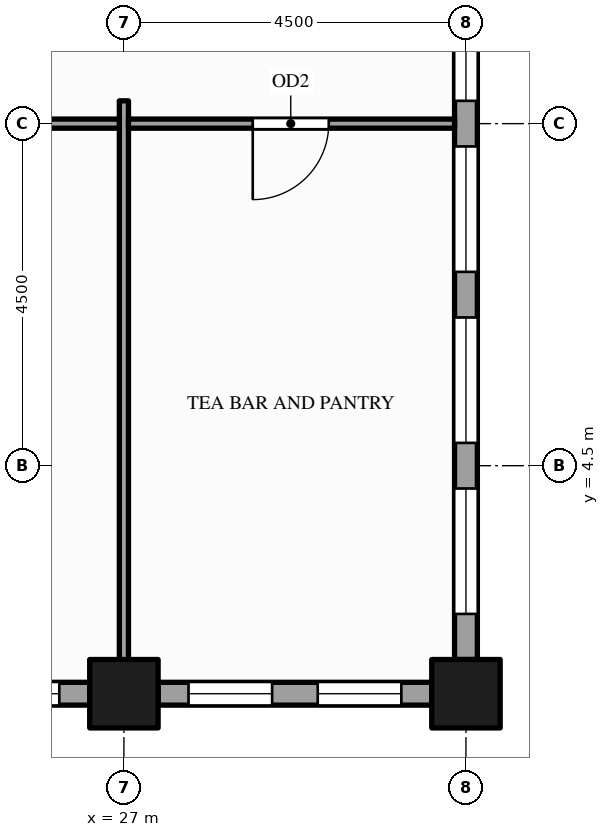
"""IFC4 building model, lengths in metres.
Left out: names, types, materials, properties, quantities, classifications, styles, units other than length and angle.
Written with IfcOpenShell. Run it as: python <this file> out.ifc"""

import sys

from ifc_helpers import new_model, si_unit, direction, frame, frame_2d, origin, origin_2d, place, context, subcontext, project, spatial, rectangle, hollow_rectangle, extrude, element, fill, save


model = new_model("IFC4")
c1 = context("Model", 3, precision=1e-05, world=origin(), true_north=direction((0.0, 1.0)))
c2 = subcontext(c1, "Body", "Model", "MODEL_VIEW")
j1 = project(units=[si_unit("LENGTHUNIT", "METRE"), si_unit("PLANEANGLEUNIT", "RADIAN")], contexts=[c1])
p1 = place(None, origin())
s1 = spatial("IfcSite", under=j1, at=p1, CompositionType="ELEMENT")
p2 = place(p1, origin())
s2 = spatial("IfcBuilding", under=s1, at=p2, CompositionType="ELEMENT")
p3 = place(p2, frame((0.0, 0.0, 143.0)))
s3 = spatial("IfcBuildingStorey", under=s2, at=p3, CompositionType="ELEMENT", Elevation=143.0)
for number, where, z_axis, x_axis in (
    (1, (27.0, 1.5, -0.15), (0.0, 0.0, 1.0), (1.0, 0.0, 0.0)),
    (2, (31.5, 1.5, -0.15), (0.0, 0.0, 1.0), (1.0, 0.0, 0.0)),
):
    element("IfcColumn", number, at=place(p3, frame(where, z_axis=z_axis, x_axis=x_axis)), inside=s3, PredefinedType="COLUMN", context=c2, shape_type="SweptSolid", body=[
        extrude(hollow_rectangle(XDim=0.9, YDim=0.9, WallThickness=0.045, at=origin_2d()), origin(), (0.0, 0.0, 1.0), 4.0),
    ])
p4 = place(p3, frame((22.95, 1.5, 0.0), z_axis=(0.0, 0.0, 1.0), x_axis=(1.0, 0.0, 0.0)))
e3 = element("IfcWall", 3, at=p4, inside=s3, PredefinedType="STANDARD", context=c2, shape_type="SweptSolid", body=[
    extrude(rectangle(XDim=3.6, YDim=0.3, at=frame_2d((1.8, 0.0))), origin(), (0.0, 0.0, 1.0), 2.87),
])
p5 = place(p4, frame((0.4, 0.0, 0.9)))
e4 = element("IfcOpeningElement", 4, at=p5, cuts=e3, PredefinedType="OPENING", context=c2, shape_type="SweptSolid", body=[
    extrude(rectangle(XDim=1.1, YDim=1.75, at=frame_2d((0.55, 0.875))), frame((0.0, 0.16, 0.0), z_axis=(0.0, -1.0, 0.0), x_axis=(1.0, 0.0, 0.0)), (0.0, 0.0, 1.0), 0.32),
])
p6 = place(p4, frame((2.1, 0.0, 0.9)))
e5 = element("IfcOpeningElement", 5, at=p6, cuts=e3, PredefinedType="OPENING", context=c2, shape_type="SweptSolid", body=[
    extrude(rectangle(XDim=1.1, YDim=1.75, at=frame_2d((0.55, 0.875))), frame((0.0, 0.16, 0.0), z_axis=(0.0, -1.0, 0.0), x_axis=(1.0, 0.0, 0.0)), (0.0, 0.0, 1.0), 0.32),
])
p7 = place(p3, frame((27.45, 1.5, 0.0), z_axis=(0.0, 0.0, 1.0), x_axis=(1.0, 0.0, 0.0)))
e6 = element("IfcWall", 6, at=p7, inside=s3, PredefinedType="STANDARD", context=c2, shape_type="SweptSolid", body=[
    extrude(rectangle(XDim=3.6, YDim=0.3, at=frame_2d((1.8, 0.0))), origin(), (0.0, 0.0, 1.0), 2.87),
])
p8 = place(p7, frame((0.4, 0.0, 0.9)))
e7 = element("IfcOpeningElement", 7, at=p8, cuts=e6, PredefinedType="OPENING", context=c2, shape_type="SweptSolid", body=[
    extrude(rectangle(XDim=1.1, YDim=1.75, at=frame_2d((0.55, 0.875))), frame((0.0, 0.16, 0.0), z_axis=(0.0, -1.0, 0.0), x_axis=(1.0, 0.0, 0.0)), (0.0, 0.0, 1.0), 0.32),
])
p9 = place(p7, frame((2.1, 0.0, 0.9)))
e8 = element("IfcOpeningElement", 8, at=p9, cuts=e6, PredefinedType="OPENING", context=c2, shape_type="SweptSolid", body=[
    extrude(rectangle(XDim=1.1, YDim=1.75, at=frame_2d((0.55, 0.875))), frame((0.0, 0.16, 0.0), z_axis=(0.0, -1.0, 0.0), x_axis=(1.0, 0.0, 0.0)), (0.0, 0.0, 1.0), 0.32),
])
p10 = place(p3, frame((31.5, 1.95, 0.0), z_axis=(0.0, 0.0, 1.0), x_axis=(0.0, 1.0, 0.0)))
e9 = element("IfcWall", 9, at=p10, inside=s3, PredefinedType="STANDARD", context=c2, shape_type="SweptSolid", body=[
    extrude(rectangle(XDim=21.6, YDim=0.3, at=frame_2d((10.8, 0.0))), origin(), (0.0, 0.0, 1.0), 3.149),
])
p11 = place(p10, frame((0.6, 0.0, 0.9)))
e10 = element("IfcOpeningElement", 10, at=p11, cuts=e9, PredefinedType="OPENING", context=c2, shape_type="SweptSolid", body=[
    extrude(rectangle(XDim=1.65, YDim=2.0, at=frame_2d((0.825, 1.0))), frame((0.0, 0.16, 0.0), z_axis=(0.0, -1.0, 0.0), x_axis=(1.0, 0.0, 0.0)), (0.0, 0.0, 1.0), 0.32),
])
p12 = place(p10, frame((2.85, 0.0, 0.9)))
e11 = element("IfcOpeningElement", 11, at=p12, cuts=e9, PredefinedType="OPENING", context=c2, shape_type="SweptSolid", body=[
    extrude(rectangle(XDim=1.65, YDim=2.0, at=frame_2d((0.825, 1.0))), frame((0.0, 0.16, 0.0), z_axis=(0.0, -1.0, 0.0), x_axis=(1.0, 0.0, 0.0)), (0.0, 0.0, 1.0), 0.32),
])
p13 = place(p10, frame((5.1, 0.0, 0.9)))
e12 = element("IfcOpeningElement", 12, at=p13, cuts=e9, PredefinedType="OPENING", context=c2, shape_type="SweptSolid", body=[
    extrude(rectangle(XDim=1.65, YDim=2.0, at=frame_2d((0.825, 1.0))), frame((0.0, 0.16, 0.0), z_axis=(0.0, -1.0, 0.0), x_axis=(1.0, 0.0, 0.0)), (0.0, 0.0, 1.0), 0.32),
])
p14 = place(p10, frame((7.35, 0.0, 0.9)))
e13 = element("IfcOpeningElement", 13, at=p14, cuts=e9, PredefinedType="OPENING", context=c2, shape_type="SweptSolid", body=[
    extrude(rectangle(XDim=1.65, YDim=2.0, at=frame_2d((0.825, 1.0))), frame((0.0, 0.16, 0.0), z_axis=(0.0, -1.0, 0.0), x_axis=(1.0, 0.0, 0.0)), (0.0, 0.0, 1.0), 0.32),
])
p15 = place(p10, frame((9.6, 0.0, 0.9)))
e14 = element("IfcOpeningElement", 14, at=p15, cuts=e9, PredefinedType="OPENING", context=c2, shape_type="SweptSolid", body=[
    extrude(rectangle(XDim=1.65, YDim=2.0, at=frame_2d((0.825, 1.0))), frame((0.0, 0.16, 0.0), z_axis=(0.0, -1.0, 0.0), x_axis=(1.0, 0.0, 0.0)), (0.0, 0.0, 1.0), 0.32),
])
p16 = place(p10, frame((11.85, 0.0, 0.9)))
e15 = element("IfcOpeningElement", 15, at=p16, cuts=e9, PredefinedType="OPENING", context=c2, shape_type="SweptSolid", body=[
    extrude(rectangle(XDim=1.65, YDim=2.0, at=frame_2d((0.825, 1.0))), frame((0.0, 0.16, 0.0), z_axis=(0.0, -1.0, 0.0), x_axis=(1.0, 0.0, 0.0)), (0.0, 0.0, 1.0), 0.32),
])
p17 = place(p10, frame((14.1, 0.0, 0.9)))
e16 = element("IfcOpeningElement", 16, at=p17, cuts=e9, PredefinedType="OPENING", context=c2, shape_type="SweptSolid", body=[
    extrude(rectangle(XDim=1.65, YDim=2.0, at=frame_2d((0.825, 1.0))), frame((0.0, 0.16, 0.0), z_axis=(0.0, -1.0, 0.0), x_axis=(1.0, 0.0, 0.0)), (0.0, 0.0, 1.0), 0.32),
])
p18 = place(p10, frame((16.35, 0.0, 0.9)))
e17 = element("IfcOpeningElement", 17, at=p18, cuts=e9, PredefinedType="OPENING", context=c2, shape_type="SweptSolid", body=[
    extrude(rectangle(XDim=1.65, YDim=2.0, at=frame_2d((0.825, 1.0))), frame((0.0, 0.16, 0.0), z_axis=(0.0, -1.0, 0.0), x_axis=(1.0, 0.0, 0.0)), (0.0, 0.0, 1.0), 0.32),
])
p19 = place(p10, frame((18.6, 0.0, 0.9)))
e18 = element("IfcOpeningElement", 18, at=p19, cuts=e9, PredefinedType="OPENING", context=c2, shape_type="SweptSolid", body=[
    extrude(rectangle(XDim=1.65, YDim=2.0, at=frame_2d((0.825, 1.0))), frame((0.0, 0.16, 0.0), z_axis=(0.0, -1.0, 0.0), x_axis=(1.0, 0.0, 0.0)), (0.0, 0.0, 1.0), 0.32),
])
p20 = place(p3, frame((27.0, 1.65, 0.0), z_axis=(0.0, 0.0, 1.0), x_axis=(0.0, 1.0, 0.0)))
e19 = element("IfcWall", 19, at=p20, inside=s3, PredefinedType="PARTITIONING", context=c2, shape_type="SweptSolid", body=[
    extrude(rectangle(XDim=7.65, YDim=0.12, at=frame_2d((3.825, 0.0))), origin(), (0.0, 0.0, 1.0), 2.87),
])
p21 = place(p3, frame((18.06, 9.0, 0.0), z_axis=(0.0, 0.0, 1.0), x_axis=(1.0, 0.0, 0.0)))
e20 = element("IfcWall", 20, at=p21, inside=s3, PredefinedType="PARTITIONING", context=c2, shape_type="SweptSolid", body=[
    extrude(rectangle(XDim=8.88, YDim=0.12, at=frame_2d((4.44, 0.0))), origin(), (0.0, 0.0, 1.0), 2.87),
])
p22 = place(p21, frame((3.54, 0.0, 0.0)))
e21 = element("IfcOpeningElement", 21, at=p22, cuts=e20, PredefinedType="OPENING", context=c2, shape_type="SweptSolid", body=[
    extrude(rectangle(XDim=1.8, YDim=2.1, at=frame_2d((0.9, 1.05))), frame((0.0, 0.07, 0.0), z_axis=(0.0, -1.0, 0.0), x_axis=(1.0, 0.0, 0.0)), (0.0, 0.0, 1.0), 0.14),
])
p23 = place(p3, frame((27.06, 9.0, 0.0), z_axis=(0.0, 0.0, 1.0), x_axis=(1.0, 0.0, 0.0)))
e22 = element("IfcWall", 22, at=p23, inside=s3, PredefinedType="PARTITIONING", context=c2, shape_type="SweptSolid", body=[
    extrude(rectangle(XDim=4.29, YDim=0.12, at=frame_2d((2.145, 0.0))), origin(), (0.0, 0.0, 1.0), 2.87),
])
p24 = place(p23, frame((1.635, 0.0, 0.0)))
e23 = element("IfcOpeningElement", 23, at=p24, cuts=e22, PredefinedType="OPENING", context=c2, shape_type="SweptSolid", body=[
    extrude(rectangle(XDim=1.0, YDim=2.1, at=frame_2d((0.5, 1.05))), frame((0.0, 0.07, 0.0), z_axis=(0.0, -1.0, 0.0), x_axis=(1.0, 0.0, 0.0)), (0.0, 0.0, 1.0), 0.14),
])
p25 = place(p6, origin())
e24 = element("IfcWindow", 24, at=p25, inside=s3, PartitioningType="SINGLE_PANEL", PredefinedType="WINDOW", context=c2, shape_type="SweptSolid", body=[
    extrude(rectangle(XDim=1.1, YDim=1.75, at=frame_2d((0.55, 0.875))), frame((0.0, 0.03, 0.0), z_axis=(0.0, -1.0, 0.0), x_axis=(1.0, 0.0, 0.0)), (0.0, 0.0, 1.0), 0.06),
])
fill(e5, e24)
p26 = place(p8, origin())
e25 = element("IfcWindow", 25, at=p26, inside=s3, PartitioningType="SINGLE_PANEL", PredefinedType="WINDOW", context=c2, shape_type="SweptSolid", body=[
    extrude(rectangle(XDim=1.1, YDim=1.75, at=frame_2d((0.55, 0.875))), frame((0.0, 0.03, 0.0), z_axis=(0.0, -1.0, 0.0), x_axis=(1.0, 0.0, 0.0)), (0.0, 0.0, 1.0), 0.06),
])
fill(e7, e25)
p27 = place(p9, origin())
e26 = element("IfcWindow", 26, at=p27, inside=s3, PartitioningType="SINGLE_PANEL", PredefinedType="WINDOW", context=c2, shape_type="SweptSolid", body=[
    extrude(rectangle(XDim=1.1, YDim=1.75, at=frame_2d((0.55, 0.875))), frame((0.0, 0.03, 0.0), z_axis=(0.0, -1.0, 0.0), x_axis=(1.0, 0.0, 0.0)), (0.0, 0.0, 1.0), 0.06),
])
fill(e8, e26)
p28 = place(p11, origin())
e27 = element("IfcWindow", 27, at=p28, inside=s3, PartitioningType="SINGLE_PANEL", PredefinedType="WINDOW", context=c2, shape_type="SweptSolid", body=[
    extrude(rectangle(XDim=1.65, YDim=2.0, at=frame_2d((0.825, 1.0))), frame((0.0, 0.03, 0.0), z_axis=(0.0, -1.0, 0.0), x_axis=(1.0, 0.0, 0.0)), (0.0, 0.0, 1.0), 0.06),
])
fill(e10, e27)
p29 = place(p12, origin())
e28 = element("IfcWindow", 28, at=p29, inside=s3, PartitioningType="SINGLE_PANEL", PredefinedType="WINDOW", context=c2, shape_type="SweptSolid", body=[
    extrude(rectangle(XDim=1.65, YDim=2.0, at=frame_2d((0.825, 1.0))), frame((0.0, 0.03, 0.0), z_axis=(0.0, -1.0, 0.0), x_axis=(1.0, 0.0, 0.0)), (0.0, 0.0, 1.0), 0.06),
])
fill(e11, e28)
p30 = place(p13, origin())
e29 = element("IfcWindow", 29, at=p30, inside=s3, PartitioningType="SINGLE_PANEL", PredefinedType="WINDOW", context=c2, shape_type="SweptSolid", body=[
    extrude(rectangle(XDim=1.65, YDim=2.0, at=frame_2d((0.825, 1.0))), frame((0.0, 0.03, 0.0), z_axis=(0.0, -1.0, 0.0), x_axis=(1.0, 0.0, 0.0)), (0.0, 0.0, 1.0), 0.06),
])
fill(e12, e29)
p31 = place(p14, origin())
e30 = element("IfcWindow", 30, at=p31, inside=s3, PartitioningType="SINGLE_PANEL", PredefinedType="WINDOW", context=c2, shape_type="SweptSolid", body=[
    extrude(rectangle(XDim=1.65, YDim=2.0, at=frame_2d((0.825, 1.0))), frame((0.0, 0.03, 0.0), z_axis=(0.0, -1.0, 0.0), x_axis=(1.0, 0.0, 0.0)), (0.0, 0.0, 1.0), 0.06),
])
fill(e13, e30)
p32 = place(p24, origin())
e31 = element("IfcDoor", 31, at=p32, inside=s3, OperationType="SINGLE_SWING_LEFT", PredefinedType="DOOR", context=c2, shape_type="SweptSolid", body=[
    extrude(rectangle(XDim=1.0, YDim=2.1, at=frame_2d((0.5, 1.05))), frame((0.0, 0.025, 0.0), z_axis=(0.0, -1.0, 0.0), x_axis=(1.0, 0.0, 0.0)), (0.0, 0.0, 1.0), 0.05),
])
fill(e23, e31)
save(model, sys.argv[1])
